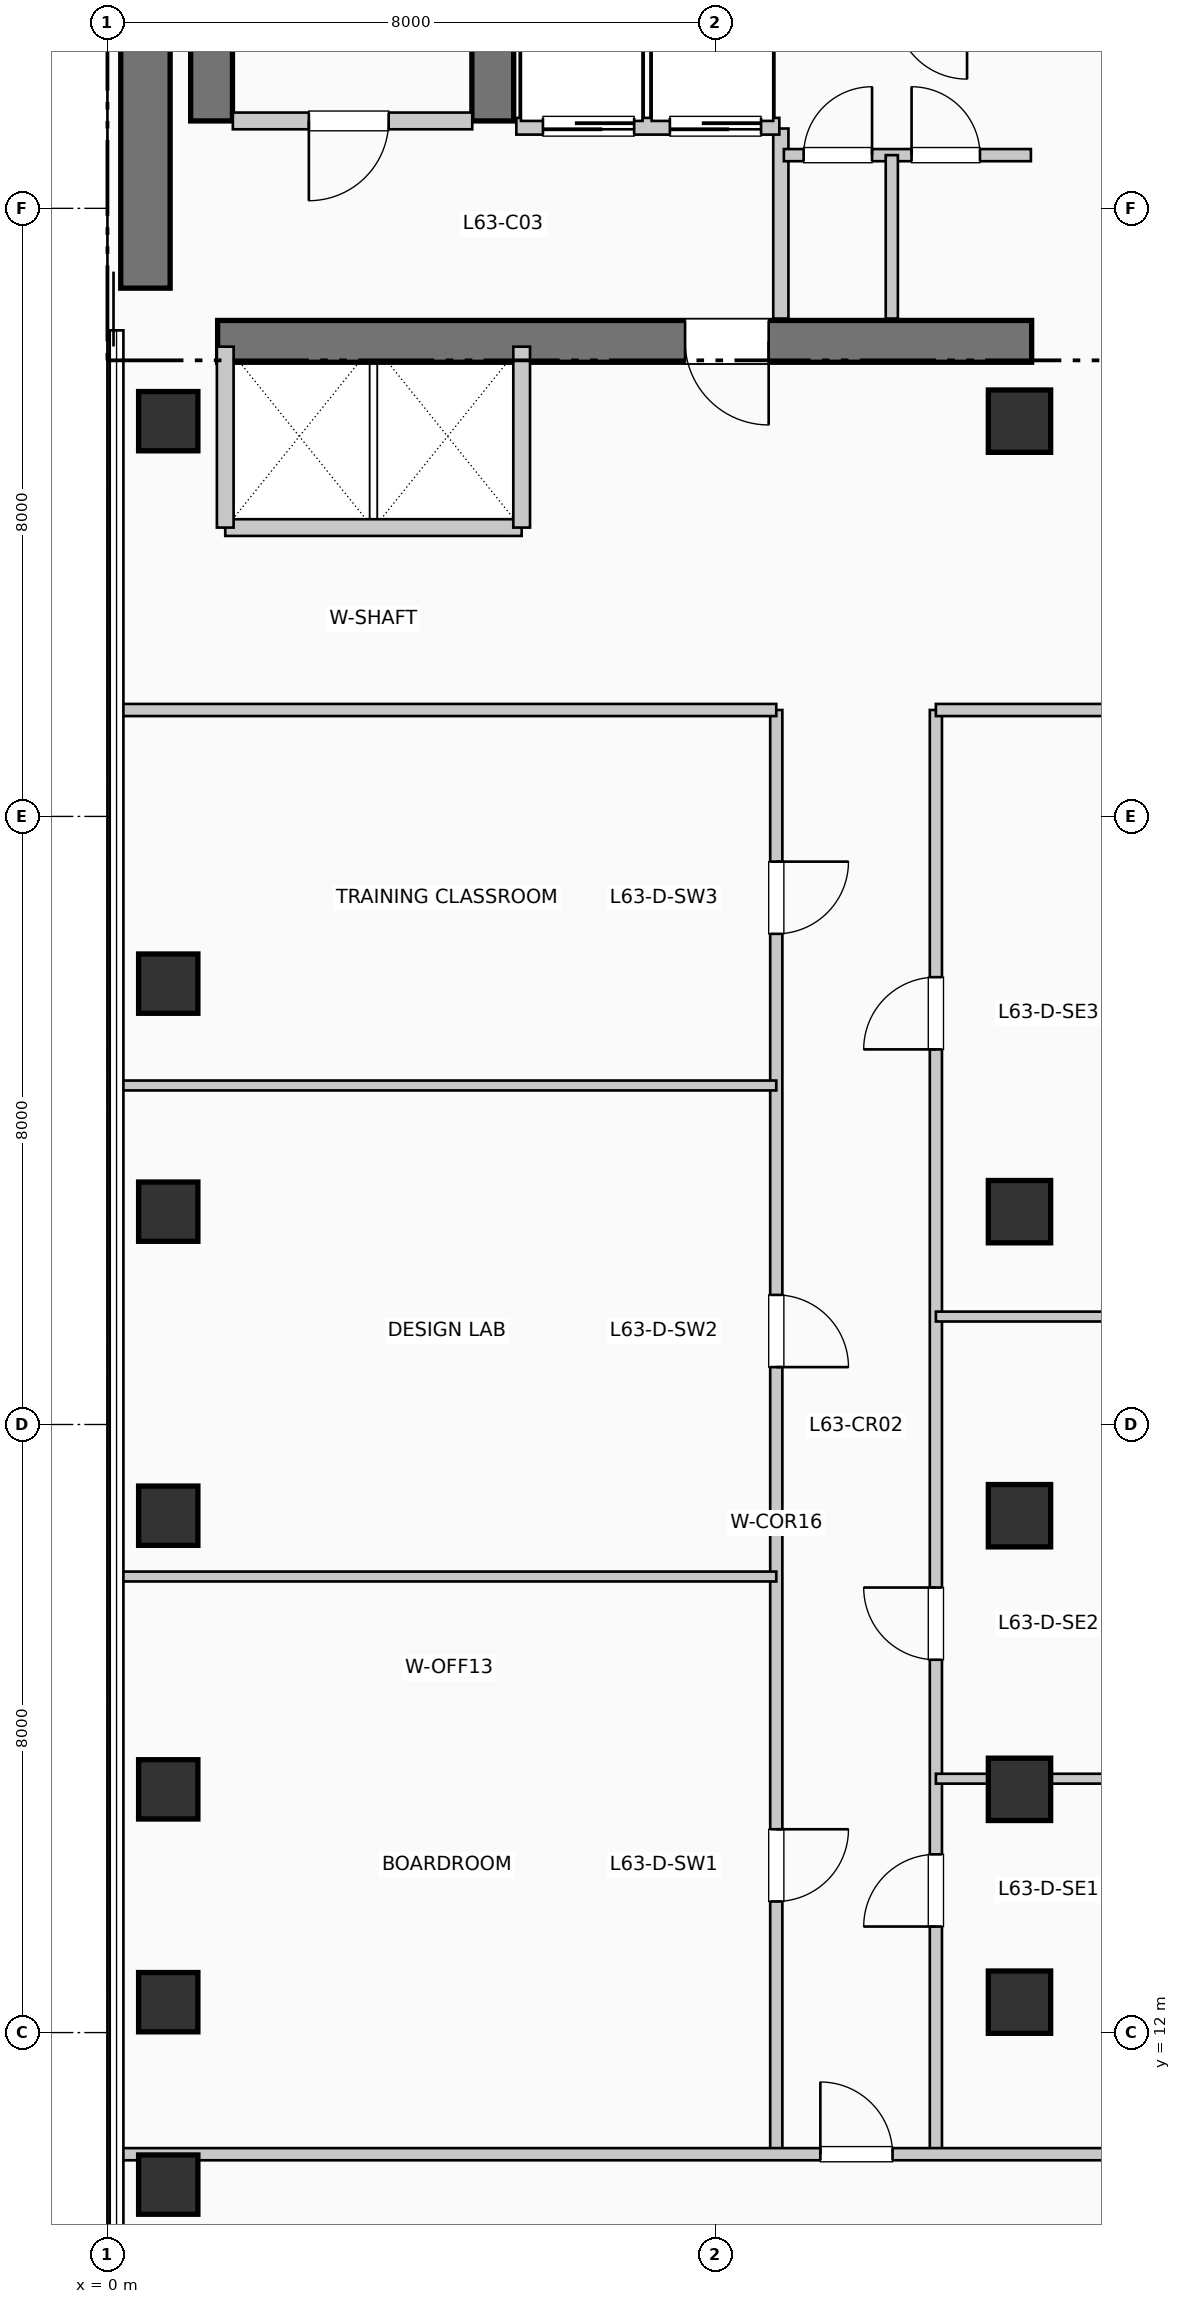
"""IFC4 building model, lengths in metres.
Left out: names, types, materials, properties, quantities, classifications, styles, units other than length and angle.
Written with IfcOpenShell. Run it as: python <this file> out.ifc"""

import sys

from ifc_helpers import new_model, si_unit, direction, frame, frame_2d, origin, origin_2d, place, context, subcontext, project, spatial, rectangle, extrude, element, fill, save


model = new_model("IFC4")
c1 = context("Model", 3, precision=1e-05, world=origin(), true_north=direction((0.0, 1.0)))
c2 = subcontext(c1, "Body", "Model", "MODEL_VIEW")
j1 = project(units=[si_unit("LENGTHUNIT", "METRE"), si_unit("PLANEANGLEUNIT", "RADIAN")], contexts=[c1])
p1 = place(None, origin())
s1 = spatial("IfcSite", under=j1, at=p1, CompositionType="ELEMENT")
p2 = place(p1, origin())
s2 = spatial("IfcBuilding", under=s1, at=p2, CompositionType="ELEMENT")
p3 = place(p2, frame((0.0, 0.0, 260.37)))
s3 = spatial("IfcBuildingStorey", under=s2, at=p3, CompositionType="ELEMENT", Elevation=260.37)
p4 = place(p3, frame((0.5, 34.95, 0.0), z_axis=(0.0, 0.0, 1.0), x_axis=(0.0, 1.0, 0.0)))
e1 = element("IfcWall", 1, at=p4, inside=s3, PredefinedType="SHEAR", context=c2, shape_type="SweptSolid", body=[
    extrude(rectangle(XDim=7.9, YDim=0.65, at=frame_2d((3.95, 0.0))), origin(), (0.0, 0.0, 1.0), 3.96),
])
p5 = place(p3, frame((1.45, 34.25, 0.0), z_axis=(0.0, 0.0, 1.0), x_axis=(1.0, 0.0, 0.0)))
e2 = element("IfcWall", 2, at=p5, inside=s3, PredefinedType="SHEAR", context=c2, shape_type="SweptSolid", body=[
    extrude(rectangle(XDim=10.71, YDim=0.55, at=frame_2d((5.355, 0.0))), origin(), (0.0, 0.0, 1.0), 3.96),
])
p6 = place(p5, frame((7.25, 0.0, 0.0), z_axis=(0.0, 0.0, 1.0), x_axis=(-1.0, 0.0, 0.0)))
e3 = element("IfcOpeningElement", 3, at=p6, cuts=e2, PredefinedType="OPENING", context=c2, shape_type="SweptSolid", body=[
    extrude(rectangle(XDim=1.1, YDim=2.15, at=frame_2d((0.55, 1.075))), frame((0.0, 0.285, 0.0), z_axis=(0.0, -1.0, 0.0), x_axis=(1.0, 0.0, 0.0)), (0.0, 0.0, 1.0), 0.57),
])
for number, where, z_axis, x_axis in (
    (4, (1.37, 37.15, 0.0), (0.0, 0.0, 1.0), (0.0, 1.0, 0.0)),
    (5, (5.07, 37.15, 0.0), (0.0, 0.0, 1.0), (0.0, 1.0, 0.0)),
):
    element("IfcWall", number, at=place(p3, frame(where, z_axis=z_axis, x_axis=x_axis)), inside=s3, PredefinedType="SHEAR", context=c2, shape_type="SweptSolid", body=[
        extrude(rectangle(XDim=7.89, YDim=0.55, at=frame_2d((3.945, 0.0))), origin(), (0.0, 0.0, 1.0), 3.96),
    ])
for number, where, z_axis, x_axis in (
    (6, (0.8, 10.0, 0.0), (0.0, 0.0, 1.0), (1.0, 0.0, 0.0)),
    (7, (0.8, 12.4, 0.0), (0.0, 0.0, 1.0), (1.0, 0.0, 0.0)),
    (8, (0.8, 15.2, 0.0), (0.0, 0.0, 1.0), (1.0, 0.0, 0.0)),
    (9, (0.8, 18.8, 0.0), (0.0, 0.0, 1.0), (1.0, 0.0, 0.0)),
    (10, (0.8, 22.8, 0.0), (0.0, 0.0, 1.0), (1.0, 0.0, 0.0)),
    (11, (0.8, 25.8, 0.0), (0.0, 0.0, 1.0), (1.0, 0.0, 0.0)),
    (12, (0.8, 33.2, 0.0), (0.0, 0.0, 1.0), (1.0, 0.0, 0.0)),
):
    element("IfcColumn", number, at=place(p3, frame(where, z_axis=z_axis, x_axis=x_axis)), inside=s3, PredefinedType="COLUMN", context=c2, shape_type="SweptSolid", body=[
        extrude(rectangle(XDim=0.78, YDim=0.78, at=origin_2d()), origin(), (0.0, 0.0, 1.0), 3.96),
    ])
for number, where, z_axis, x_axis in (
    (13, (12.0, 12.4, 0.0), (0.0, 0.0, 1.0), (1.0, 0.0, 0.0)),
    (14, (12.0, 15.2, 0.0), (0.0, 0.0, 1.0), (1.0, 0.0, 0.0)),
    (15, (12.0, 18.8, 0.0), (0.0, 0.0, 1.0), (1.0, 0.0, 0.0)),
    (16, (12.0, 22.8, 0.0), (0.0, 0.0, 1.0), (1.0, 0.0, 0.0)),
    (17, (12.0, 33.2, 0.0), (0.0, 0.0, 1.0), (1.0, 0.0, 0.0)),
):
    element("IfcColumn", number, at=place(p3, frame(where, z_axis=z_axis, x_axis=x_axis)), inside=s3, PredefinedType="COLUMN", context=c2, shape_type="SweptSolid", body=[
        extrude(rectangle(XDim=0.82, YDim=0.82, at=origin_2d()), origin(), (0.0, 0.0, 1.0), 3.96),
    ])
p7 = place(p3, frame((1.65, 37.15, 0.0), z_axis=(0.0, 0.0, 1.0), x_axis=(1.0, 0.0, 0.0)))
e18 = element("IfcWall", 18, at=p7, inside=s3, PredefinedType="PARTITIONING", context=c2, shape_type="SweptSolid", body=[
    extrude(rectangle(XDim=3.15, YDim=0.22, at=frame_2d((1.575, 0.0))), origin(), (0.0, 0.0, 1.0), 3.71),
])
p8 = place(p7, frame((2.05, 0.0, 0.0), z_axis=(0.0, 0.0, 1.0), x_axis=(-1.0, 0.0, 0.0)))
e19 = element("IfcOpeningElement", 19, at=p8, cuts=e18, PredefinedType="OPENING", context=c2, shape_type="SweptSolid", body=[
    extrude(rectangle(XDim=1.05, YDim=2.15, at=frame_2d((0.525, 1.075))), frame((0.0, 0.12, 0.0), z_axis=(0.0, -1.0, 0.0), x_axis=(1.0, 0.0, 0.0)), (0.0, 0.0, 1.0), 0.24),
])
p9 = place(p3, frame((8.86, 34.55, 0.0), z_axis=(0.0, 0.0, 1.0), x_axis=(0.0, 1.0, 0.0)))
e20 = element("IfcWall", 20, at=p9, inside=s3, PredefinedType="PARTITIONING", context=c2, shape_type="SweptSolid", body=[
    extrude(rectangle(XDim=2.5, YDim=0.2, at=frame_2d((1.25, 0.0))), origin(), (0.0, 0.0, 1.0), 3.71),
])
p10 = place(p3, frame((5.38, 37.08, 0.0), z_axis=(0.0, 0.0, 1.0), x_axis=(1.0, 0.0, 0.0)))
e21 = element("IfcWall", 21, at=p10, inside=s3, PredefinedType="PARTITIONING", context=c2, shape_type="SweptSolid", body=[
    extrude(rectangle(XDim=3.46, YDim=0.22, at=frame_2d((1.73, 0.0))), origin(), (0.0, 0.0, 1.0), 3.71),
])
p11 = place(p10, frame((1.55, 0.0, 0.0), z_axis=(0.0, 0.0, 1.0), x_axis=(-1.0, 0.0, 0.0)))
e22 = element("IfcOpeningElement", 22, at=p11, cuts=e21, PredefinedType="OPENING", context=c2, shape_type="SweptSolid", body=[
    extrude(rectangle(XDim=1.2, YDim=2.2, at=frame_2d((0.6, 1.1))), frame((0.0, 0.12, 0.0), z_axis=(0.0, -1.0, 0.0), x_axis=(1.0, 0.0, 0.0)), (0.0, 0.0, 1.0), 0.24),
])
p12 = place(p10, frame((3.22, 0.0, 0.0), z_axis=(0.0, 0.0, 1.0), x_axis=(-1.0, 0.0, 0.0)))
e23 = element("IfcOpeningElement", 23, at=p12, cuts=e21, PredefinedType="OPENING", context=c2, shape_type="SweptSolid", body=[
    extrude(rectangle(XDim=1.2, YDim=2.2, at=frame_2d((0.6, 1.1))), frame((0.0, 0.12, 0.0), z_axis=(0.0, -1.0, 0.0), x_axis=(1.0, 0.0, 0.0)), (0.0, 0.0, 1.0), 0.24),
])
p13 = place(p3, frame((1.55, 31.8, 0.0), z_axis=(0.0, 0.0, 1.0), x_axis=(1.0, 0.0, 0.0)))
e24 = element("IfcWall", 24, at=p13, inside=s3, PredefinedType="PARTITIONING", context=c2, shape_type="SweptSolid", body=[
    extrude(rectangle(XDim=3.9, YDim=0.22, at=frame_2d((1.95, 0.0))), origin(), (0.0, 0.0, 1.0), 3.71),
])
for number, where, z_axis, x_axis in (
    (25, (1.55, 31.8, 0.0), (0.0, 0.0, 1.0), (0.0, 1.0, 0.0)),
    (26, (5.45, 31.8, 0.0), (0.0, 0.0, 1.0), (0.0, 1.0, 0.0)),
):
    element("IfcWall", number, at=place(p3, frame(where, z_axis=z_axis, x_axis=x_axis)), inside=s3, PredefinedType="PARTITIONING", context=c2, shape_type="SweptSolid", body=[
        extrude(rectangle(XDim=2.38, YDim=0.22, at=frame_2d((1.19, 0.0))), origin(), (0.0, 0.0, 1.0), 3.71),
    ])
p14 = place(p3, frame((8.9, 36.7, 0.0), z_axis=(0.0, 0.0, 1.0), x_axis=(1.0, 0.0, 0.0)))
e27 = element("IfcWall", 27, at=p14, inside=s3, PredefinedType="PARTITIONING", context=c2, shape_type="SweptSolid", body=[
    extrude(rectangle(XDim=3.25, YDim=0.16, at=frame_2d((1.625, 0.0))), origin(), (0.0, 0.0, 1.0), 3.71),
])
p15 = place(p14, frame((0.26, 0.0, 0.0)))
e28 = element("IfcOpeningElement", 28, at=p15, cuts=e27, PredefinedType="OPENING", context=c2, shape_type="SweptSolid", body=[
    extrude(rectangle(XDim=0.9, YDim=2.15, at=frame_2d((0.45, 1.075))), frame((0.0, 0.09, 0.0), z_axis=(0.0, -1.0, 0.0), x_axis=(1.0, 0.0, 0.0)), (0.0, 0.0, 1.0), 0.18),
])
p16 = place(p14, frame((1.68, 0.0, 0.0)))
e29 = element("IfcOpeningElement", 29, at=p16, cuts=e27, PredefinedType="OPENING", context=c2, shape_type="SweptSolid", body=[
    extrude(rectangle(XDim=0.9, YDim=2.15, at=frame_2d((0.45, 1.075))), frame((0.0, 0.09, 0.0), z_axis=(0.0, -1.0, 0.0), x_axis=(1.0, 0.0, 0.0)), (0.0, 0.0, 1.0), 0.18),
])
p17 = place(p3, frame((10.32, 34.55, 0.0), z_axis=(0.0, 0.0, 1.0), x_axis=(0.0, 1.0, 0.0)))
e30 = element("IfcWall", 30, at=p17, inside=s3, PredefinedType="PARTITIONING", context=c2, shape_type="SweptSolid", body=[
    extrude(rectangle(XDim=2.15, YDim=0.16, at=frame_2d((1.075, 0.0))), origin(), (0.0, 0.0, 1.0), 3.71),
])
p18 = place(p3, frame((8.8, 10.4, 0.0), z_axis=(0.0, 0.0, 1.0), x_axis=(0.0, 1.0, 0.0)))
e31 = element("IfcWall", 31, at=p18, inside=s3, PredefinedType="PARTITIONING", context=c2, shape_type="SweptSolid", body=[
    extrude(rectangle(XDim=19.0, YDim=0.16, at=frame_2d((9.5, 0.0))), origin(), (0.0, 0.0, 1.0), 3.71),
])
p19 = place(p18, frame((4.275, 0.0, 0.0), z_axis=(0.0, 0.0, 1.0), x_axis=(-1.0, 0.0, 0.0)))
e32 = element("IfcOpeningElement", 32, at=p19, cuts=e31, PredefinedType="OPENING", context=c2, shape_type="SweptSolid", body=[
    extrude(rectangle(XDim=0.95, YDim=2.15, at=frame_2d((0.475, 1.075))), frame((0.0, 0.09, 0.0), z_axis=(0.0, -1.0, 0.0), x_axis=(1.0, 0.0, 0.0)), (0.0, 0.0, 1.0), 0.18),
])
p20 = place(p18, frame((11.305, 0.0, 0.0), z_axis=(0.0, 0.0, 1.0), x_axis=(-1.0, 0.0, 0.0)))
e33 = element("IfcOpeningElement", 33, at=p20, cuts=e31, PredefinedType="OPENING", context=c2, shape_type="SweptSolid", body=[
    extrude(rectangle(XDim=0.95, YDim=2.15, at=frame_2d((0.475, 1.075))), frame((0.0, 0.09, 0.0), z_axis=(0.0, -1.0, 0.0), x_axis=(1.0, 0.0, 0.0)), (0.0, 0.0, 1.0), 0.18),
])
p21 = place(p18, frame((17.005, 0.0, 0.0), z_axis=(0.0, 0.0, 1.0), x_axis=(-1.0, 0.0, 0.0)))
e34 = element("IfcOpeningElement", 34, at=p21, cuts=e31, PredefinedType="OPENING", context=c2, shape_type="SweptSolid", body=[
    extrude(rectangle(XDim=0.95, YDim=2.15, at=frame_2d((0.475, 1.075))), frame((0.0, 0.09, 0.0), z_axis=(0.0, -1.0, 0.0), x_axis=(1.0, 0.0, 0.0)), (0.0, 0.0, 1.0), 0.18),
])
p22 = place(p3, frame((10.9, 10.4, 0.0), z_axis=(0.0, 0.0, 1.0), x_axis=(0.0, 1.0, 0.0)))
e35 = element("IfcWall", 35, at=p22, inside=s3, PredefinedType="PARTITIONING", context=c2, shape_type="SweptSolid", body=[
    extrude(rectangle(XDim=19.0, YDim=0.16, at=frame_2d((9.5, 0.0))), origin(), (0.0, 0.0, 1.0), 3.71),
])
p23 = place(p22, frame((2.995, 0.0, 0.0)))
e36 = element("IfcOpeningElement", 36, at=p23, cuts=e35, PredefinedType="OPENING", context=c2, shape_type="SweptSolid", body=[
    extrude(rectangle(XDim=0.95, YDim=2.15, at=frame_2d((0.475, 1.075))), frame((0.0, 0.09, 0.0), z_axis=(0.0, -1.0, 0.0), x_axis=(1.0, 0.0, 0.0)), (0.0, 0.0, 1.0), 0.18),
])
p24 = place(p22, frame((6.505, 0.0, 0.0)))
e37 = element("IfcOpeningElement", 37, at=p24, cuts=e35, PredefinedType="OPENING", context=c2, shape_type="SweptSolid", body=[
    extrude(rectangle(XDim=0.95, YDim=2.15, at=frame_2d((0.475, 1.075))), frame((0.0, 0.09, 0.0), z_axis=(0.0, -1.0, 0.0), x_axis=(1.0, 0.0, 0.0)), (0.0, 0.0, 1.0), 0.18),
])
p25 = place(p22, frame((14.535, 0.0, 0.0)))
e38 = element("IfcOpeningElement", 38, at=p25, cuts=e35, PredefinedType="OPENING", context=c2, shape_type="SweptSolid", body=[
    extrude(rectangle(XDim=0.95, YDim=2.15, at=frame_2d((0.475, 1.075))), frame((0.0, 0.09, 0.0), z_axis=(0.0, -1.0, 0.0), x_axis=(1.0, 0.0, 0.0)), (0.0, 0.0, 1.0), 0.18),
])
p26 = place(p3, frame((0.19, 10.4, 0.0), z_axis=(0.0, 0.0, 1.0), x_axis=(1.0, 0.0, 0.0)))
e39 = element("IfcWall", 39, at=p26, inside=s3, PredefinedType="PARTITIONING", context=c2, shape_type="SweptSolid", body=[
    extrude(rectangle(XDim=23.26, YDim=0.16, at=frame_2d((11.63, 0.0))), origin(), (0.0, 0.0, 1.0), 3.095),
])
p27 = place(p26, frame((9.19, 0.0, 0.0)))
e40 = element("IfcOpeningElement", 40, at=p27, cuts=e39, PredefinedType="OPENING", context=c2, shape_type="SweptSolid", body=[
    extrude(rectangle(XDim=0.95, YDim=2.15, at=frame_2d((0.475, 1.075))), frame((0.0, 0.09, 0.0), z_axis=(0.0, -1.0, 0.0), x_axis=(1.0, 0.0, 0.0)), (0.0, 0.0, 1.0), 0.18),
])
p28 = place(p3, frame((0.19, 29.4, 0.0), z_axis=(0.0, 0.0, 1.0), x_axis=(1.0, 0.0, 0.0)))
e41 = element("IfcWall", 41, at=p28, inside=s3, PredefinedType="PARTITIONING", context=c2, shape_type="SweptSolid", body=[
    extrude(rectangle(XDim=8.61, YDim=0.16, at=frame_2d((4.305, 0.0))), origin(), (0.0, 0.0, 1.0), 3.365),
])
p29 = place(p3, frame((10.9, 29.4, 0.0), z_axis=(0.0, 0.0, 1.0), x_axis=(1.0, 0.0, 0.0)))
e42 = element("IfcWall", 42, at=p29, inside=s3, PredefinedType="PARTITIONING", context=c2, shape_type="SweptSolid", body=[
    extrude(rectangle(XDim=12.55, YDim=0.16, at=frame_2d((6.275, 0.0))), origin(), (0.0, 0.0, 1.0), 3.365),
])
for number, where, z_axis, x_axis in (
    (43, (0.19, 18.0, 0.0), (0.0, 0.0, 1.0), (1.0, 0.0, 0.0)),
    (44, (0.19, 24.46, 0.0), (0.0, 0.0, 1.0), (1.0, 0.0, 0.0)),
):
    element("IfcWall", number, at=place(p3, frame(where, z_axis=z_axis, x_axis=x_axis)), inside=s3, PredefinedType="PARTITIONING", context=c2, shape_type="SweptSolid", body=[
        extrude(rectangle(XDim=8.61, YDim=0.13, at=frame_2d((4.305, 0.0))), origin(), (0.0, 0.0, 1.0), 3.71),
    ])
p30 = place(p3, frame((10.9, 15.34, 0.0), z_axis=(0.0, 0.0, 1.0), x_axis=(1.0, 0.0, 0.0)))
e45 = element("IfcWall", 45, at=p30, inside=s3, PredefinedType="PARTITIONING", context=c2, shape_type="SweptSolid", body=[
    extrude(rectangle(XDim=12.55, YDim=0.13, at=frame_2d((6.275, 0.0))), origin(), (0.0, 0.0, 1.0), 3.095),
])
p31 = place(p3, frame((10.9, 21.42, 0.0), z_axis=(0.0, 0.0, 1.0), x_axis=(1.0, 0.0, 0.0)))
e46 = element("IfcWall", 46, at=p31, inside=s3, PredefinedType="PARTITIONING", context=c2, shape_type="SweptSolid", body=[
    extrude(rectangle(XDim=12.55, YDim=0.13, at=frame_2d((6.275, 0.0))), origin(), (0.0, 0.0, 1.0), 3.71),
])
p32 = place(p8, origin())
e47 = element("IfcDoor", 47, at=p32, inside=s3, OperationType="SINGLE_SWING_LEFT", PredefinedType="DOOR", context=c2, shape_type="SweptSolid", body=[
    extrude(rectangle(XDim=1.05, YDim=2.15, at=frame_2d((0.525, 1.075))), frame((0.0, 0.025, 0.0), z_axis=(0.0, -1.0, 0.0), x_axis=(1.0, 0.0, 0.0)), (0.0, 0.0, 1.0), 0.05),
])
fill(e19, e47)
p33 = place(p6, origin())
e48 = element("IfcDoor", 48, at=p33, inside=s3, OperationType="SINGLE_SWING_RIGHT", PredefinedType="DOOR", context=c2, shape_type="SweptSolid", body=[
    extrude(rectangle(XDim=1.1, YDim=2.15, at=frame_2d((0.55, 1.075))), frame((0.0, 0.025, 0.0), z_axis=(0.0, -1.0, 0.0), x_axis=(1.0, 0.0, 0.0)), (0.0, 0.0, 1.0), 0.05),
])
fill(e3, e48)
p34 = place(p11, origin())
e49 = element("IfcDoor", 49, at=p34, inside=s3, OperationType="SLIDING_TO_RIGHT", PredefinedType="DOOR", context=c2, shape_type="SweptSolid", body=[
    extrude(rectangle(XDim=1.2, YDim=2.2, at=frame_2d((0.6, 1.1))), frame((0.0, 0.025, 0.0), z_axis=(0.0, -1.0, 0.0), x_axis=(1.0, 0.0, 0.0)), (0.0, 0.0, 1.0), 0.05),
])
fill(e22, e49)
p35 = place(p12, origin())
e50 = element("IfcDoor", 50, at=p35, inside=s3, OperationType="SLIDING_TO_RIGHT", PredefinedType="DOOR", context=c2, shape_type="SweptSolid", body=[
    extrude(rectangle(XDim=1.2, YDim=2.2, at=frame_2d((0.6, 1.1))), frame((0.0, 0.025, 0.0), z_axis=(0.0, -1.0, 0.0), x_axis=(1.0, 0.0, 0.0)), (0.0, 0.0, 1.0), 0.05),
])
fill(e23, e50)
p36 = place(p15, origin())
e51 = element("IfcDoor", 51, at=p36, inside=s3, OperationType="SINGLE_SWING_RIGHT", PredefinedType="DOOR", context=c2, shape_type="SweptSolid", body=[
    extrude(rectangle(XDim=0.9, YDim=2.15, at=frame_2d((0.45, 1.075))), frame((0.0, 0.025, 0.0), z_axis=(0.0, -1.0, 0.0), x_axis=(1.0, 0.0, 0.0)), (0.0, 0.0, 1.0), 0.05),
])
fill(e28, e51)
p37 = place(p16, origin())
e52 = element("IfcDoor", 52, at=p37, inside=s3, OperationType="SINGLE_SWING_LEFT", PredefinedType="DOOR", context=c2, shape_type="SweptSolid", body=[
    extrude(rectangle(XDim=0.9, YDim=2.15, at=frame_2d((0.45, 1.075))), frame((0.0, 0.025, 0.0), z_axis=(0.0, -1.0, 0.0), x_axis=(1.0, 0.0, 0.0)), (0.0, 0.0, 1.0), 0.05),
])
fill(e29, e52)
p38 = place(p27, origin())
e53 = element("IfcDoor", 53, at=p38, inside=s3, OperationType="SINGLE_SWING_LEFT", PredefinedType="DOOR", context=c2, shape_type="SweptSolid", body=[
    extrude(rectangle(XDim=0.95, YDim=2.15, at=frame_2d((0.475, 1.075))), frame((0.0, 0.025, 0.0), z_axis=(0.0, -1.0, 0.0), x_axis=(1.0, 0.0, 0.0)), (0.0, 0.0, 1.0), 0.05),
])
fill(e40, e53)
p39 = place(p19, origin())
e54 = element("IfcDoor", 54, at=p39, inside=s3, OperationType="SINGLE_SWING_RIGHT", PredefinedType="DOOR", context=c2, shape_type="SweptSolid", body=[
    extrude(rectangle(XDim=0.95, YDim=2.15, at=frame_2d((0.475, 1.075))), frame((0.0, 0.025, 0.0), z_axis=(0.0, -1.0, 0.0), x_axis=(1.0, 0.0, 0.0)), (0.0, 0.0, 1.0), 0.05),
])
fill(e32, e54)
p40 = place(p20, origin())
e55 = element("IfcDoor", 55, at=p40, inside=s3, OperationType="SINGLE_SWING_LEFT", PredefinedType="DOOR", context=c2, shape_type="SweptSolid", body=[
    extrude(rectangle(XDim=0.95, YDim=2.15, at=frame_2d((0.475, 1.075))), frame((0.0, 0.025, 0.0), z_axis=(0.0, -1.0, 0.0), x_axis=(1.0, 0.0, 0.0)), (0.0, 0.0, 1.0), 0.05),
])
fill(e33, e55)
p41 = place(p21, origin())
e56 = element("IfcDoor", 56, at=p41, inside=s3, OperationType="SINGLE_SWING_RIGHT", PredefinedType="DOOR", context=c2, shape_type="SweptSolid", body=[
    extrude(rectangle(XDim=0.95, YDim=2.15, at=frame_2d((0.475, 1.075))), frame((0.0, 0.025, 0.0), z_axis=(0.0, -1.0, 0.0), x_axis=(1.0, 0.0, 0.0)), (0.0, 0.0, 1.0), 0.05),
])
fill(e34, e56)
p42 = place(p23, origin())
e57 = element("IfcDoor", 57, at=p42, inside=s3, OperationType="SINGLE_SWING_LEFT", PredefinedType="DOOR", context=c2, shape_type="SweptSolid", body=[
    extrude(rectangle(XDim=0.95, YDim=2.15, at=frame_2d((0.475, 1.075))), frame((0.0, 0.025, 0.0), z_axis=(0.0, -1.0, 0.0), x_axis=(1.0, 0.0, 0.0)), (0.0, 0.0, 1.0), 0.05),
])
fill(e36, e57)
p43 = place(p24, origin())
e58 = element("IfcDoor", 58, at=p43, inside=s3, OperationType="SINGLE_SWING_RIGHT", PredefinedType="DOOR", context=c2, shape_type="SweptSolid", body=[
    extrude(rectangle(XDim=0.95, YDim=2.15, at=frame_2d((0.475, 1.075))), frame((0.0, 0.025, 0.0), z_axis=(0.0, -1.0, 0.0), x_axis=(1.0, 0.0, 0.0)), (0.0, 0.0, 1.0), 0.05),
])
fill(e37, e58)
p44 = place(p25, origin())
e59 = element("IfcDoor", 59, at=p44, inside=s3, OperationType="SINGLE_SWING_LEFT", PredefinedType="DOOR", context=c2, shape_type="SweptSolid", body=[
    extrude(rectangle(XDim=0.95, YDim=2.15, at=frame_2d((0.475, 1.075))), frame((0.0, 0.025, 0.0), z_axis=(0.0, -1.0, 0.0), x_axis=(1.0, 0.0, 0.0)), (0.0, 0.0, 1.0), 0.05),
])
fill(e38, e59)
save(model, sys.argv[1])
